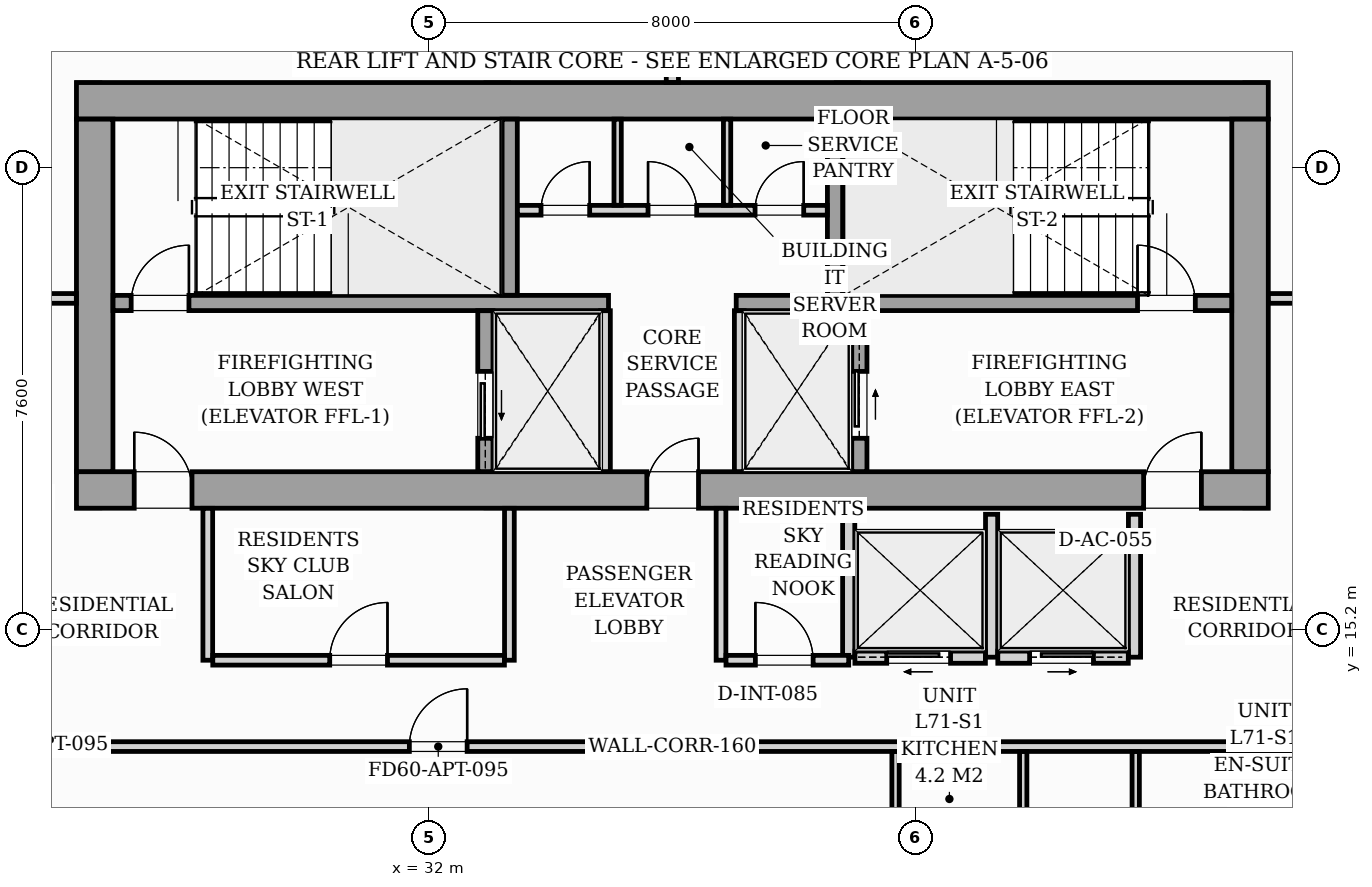
"""IFC4 building model, lengths in metres.
Left out: names, types, materials, properties, quantities, classifications, styles, units other than length and angle.
Written with IfcOpenShell. Run it as: python <this file> out.ifc"""

import sys

from ifc_helpers import new_model, si_unit, direction, frame, frame_2d, origin, origin_2d, place, context, subcontext, project, spatial, rectangle, i_section, extrude, source, transform, mapped, element, fill, save


model = new_model("IFC4")
c1 = context("Model", 3, precision=1e-05, world=origin(), true_north=direction((0.0, 1.0)))
c2 = subcontext(c1, "Body", "Model", "MODEL_VIEW")
j1 = project(units=[si_unit("LENGTHUNIT", "METRE"), si_unit("PLANEANGLEUNIT", "RADIAN")], contexts=[c1])
p1 = place(None, origin())
s1 = spatial("IfcSite", under=j1, at=p1, CompositionType="ELEMENT")
p2 = place(p1, origin())
s2 = spatial("IfcBuilding", under=s1, at=p2, CompositionType="ELEMENT")
p3 = place(p2, frame((0.0, 0.0, 246.3)))
s3 = spatial("IfcBuildingStorey", under=s2, at=p3, CompositionType="ELEMENT", Elevation=246.3)
m1 = source(origin(), c2, "Body", "SweptSolid", [
    extrude(i_section(OverallWidth=0.409, OverallDepth=0.425, WebThickness=0.033, FlangeThickness=0.052, FilletRadius=0.018, at=origin_2d()), origin(), (0.0, 0.0, 1.0), 3.296),
])
for number, where, z_axis, x_axis in (
    (1, (26.4, 17.4, 0.002), (0.0, 0.0, 1.0), (1.0, 0.0, 0.0)),
    (2, (33.12, 17.4, 0.002), (0.0, 0.0, 1.0), (1.0, 0.0, 0.0)),
    (3, (38.88, 17.4, 0.002), (0.0, 0.0, 1.0), (1.0, 0.0, 0.0)),
    (4, (45.6, 17.4, 0.002), (0.0, 0.0, 1.0), (1.0, 0.0, 0.0)),
    (5, (26.4, 24.0, 0.002), (0.0, 0.0, 1.0), (1.0, 0.0, 0.0)),
    (6, (33.12, 24.0, 0.002), (0.0, 0.0, 1.0), (1.0, 0.0, 0.0)),
    (7, (38.88, 24.0, 0.002), (0.0, 0.0, 1.0), (1.0, 0.0, 0.0)),
    (8, (45.6, 24.0, 0.002), (0.0, 0.0, 1.0), (1.0, 0.0, 0.0)),
):
    element("IfcColumn", number, at=place(p3, frame(where, z_axis=z_axis, x_axis=x_axis)), inside=s3, PredefinedType="PILASTER", context=c2, shape_type="MappedRepresentation", body=[
        mapped(m1, transform((0.0, 0.0, 0.0), scale=1.0)),
    ])
p4 = place(p3, frame((26.2, 17.5, 0.0), z_axis=(0.0, 0.0, 1.0), x_axis=(1.0, 0.0, 0.0)))
e9 = element("IfcWall", 9, at=p4, inside=s3, PredefinedType="SHEAR", context=c2, shape_type="SweptSolid", body=[
    extrude(rectangle(XDim=19.6, YDim=0.6, at=frame_2d((9.8, 0.0))), origin(), (0.0, 0.0, 1.0), 3.3),
])
p5 = place(p4, frame((0.95, 0.0, 0.0)))
e10 = element("IfcOpeningElement", 10, at=p5, cuts=e9, PredefinedType="OPENING", context=c2, shape_type="SweptSolid", body=[
    extrude(rectangle(XDim=0.95, YDim=2.06, at=frame_2d((0.475, 1.03))), frame((0.0, 0.31, 0.0), z_axis=(0.0, -1.0, 0.0), x_axis=(1.0, 0.0, 0.0)), (0.0, 0.0, 1.0), 0.62),
])
p6 = place(p4, frame((9.38, 0.0, 0.0)))
e11 = element("IfcOpeningElement", 11, at=p6, cuts=e9, PredefinedType="OPENING", context=c2, shape_type="SweptSolid", body=[
    extrude(rectangle(XDim=0.85, YDim=2.0, at=frame_2d((0.425, 1.0))), frame((0.0, 0.31, 0.0), z_axis=(0.0, -1.0, 0.0), x_axis=(1.0, 0.0, 0.0)), (0.0, 0.0, 1.0), 0.62),
])
p7 = place(p4, frame((17.55, 0.0, 0.0)))
e12 = element("IfcOpeningElement", 12, at=p7, cuts=e9, PredefinedType="OPENING", context=c2, shape_type="SweptSolid", body=[
    extrude(rectangle(XDim=0.95, YDim=2.06, at=frame_2d((0.475, 1.03))), frame((0.0, 0.31, 0.0), z_axis=(0.0, -1.0, 0.0), x_axis=(1.0, 0.0, 0.0)), (0.0, 0.0, 1.0), 0.62),
])
p8 = place(p3, frame((26.2, 23.9, 0.0), z_axis=(0.0, 0.0, 1.0), x_axis=(1.0, 0.0, 0.0)))
e13 = element("IfcWall", 13, at=p8, inside=s3, PredefinedType="SHEAR", context=c2, shape_type="SweptSolid", body=[
    extrude(rectangle(XDim=19.6, YDim=0.6, at=frame_2d((9.8, 0.0))), origin(), (0.0, 0.0, 1.0), 3.3),
])
for number, where, z_axis, x_axis in (
    (14, (26.5, 17.802, 0.0), (0.0, 0.0, 1.0), (0.0, 1.0, 0.0)),
    (15, (45.5, 17.802, 0.0), (0.0, 0.0, 1.0), (0.0, 1.0, 0.0)),
):
    element("IfcWall", number, at=place(p3, frame(where, z_axis=z_axis, x_axis=x_axis)), inside=s3, PredefinedType="SHEAR", context=c2, shape_type="SweptSolid", body=[
        extrude(rectangle(XDim=5.796, YDim=0.6, at=frame_2d((2.898, 0.0))), origin(), (0.0, 0.0, 1.0), 3.3),
    ])
p9 = place(p3, frame((26.802, 20.575, 0.0), z_axis=(0.0, 0.0, 1.0), x_axis=(1.0, 0.0, 0.0)))
e16 = element("IfcWall", 16, at=p9, inside=s3, PredefinedType="SOLIDWALL", context=c2, shape_type="SweptSolid", body=[
    extrude(rectangle(XDim=8.148, YDim=0.25, at=frame_2d((4.074, 0.0))), origin(), (0.0, 0.0, 1.0), 3.3),
])
p10 = place(p9, frame((0.298, 0.0, 0.0)))
e17 = element("IfcOpeningElement", 17, at=p10, cuts=e16, PredefinedType="OPENING", context=c2, shape_type="SweptSolid", body=[
    extrude(rectangle(XDim=0.95, YDim=2.06, at=frame_2d((0.475, 1.03))), frame((0.0, 0.135, 0.0), z_axis=(0.0, -1.0, 0.0), x_axis=(1.0, 0.0, 0.0)), (0.0, 0.0, 1.0), 0.27),
])
p11 = place(p3, frame((37.05, 20.575, 0.0), z_axis=(0.0, 0.0, 1.0), x_axis=(1.0, 0.0, 0.0)))
e18 = element("IfcWall", 18, at=p11, inside=s3, PredefinedType="SOLIDWALL", context=c2, shape_type="SweptSolid", body=[
    extrude(rectangle(XDim=8.148, YDim=0.25, at=frame_2d((4.074, 0.0))), origin(), (0.0, 0.0, 1.0), 3.3),
])
p12 = place(p11, frame((6.6, 0.0, 0.0)))
e19 = element("IfcOpeningElement", 19, at=p12, cuts=e18, PredefinedType="OPENING", context=c2, shape_type="SweptSolid", body=[
    extrude(rectangle(XDim=0.95, YDim=2.06, at=frame_2d((0.475, 1.03))), frame((0.0, 0.135, 0.0), z_axis=(0.0, -1.0, 0.0), x_axis=(1.0, 0.0, 0.0)), (0.0, 0.0, 1.0), 0.27),
])
for number, where, z_axis, x_axis in (
    (20, (33.325, 20.702, 0.0), (0.0, 0.0, 1.0), (0.0, 1.0, 0.0)),
    (21, (38.675, 20.702, 0.0), (0.0, 0.0, 1.0), (0.0, 1.0, 0.0)),
):
    element("IfcWall", number, at=place(p3, frame(where, z_axis=z_axis, x_axis=x_axis)), inside=s3, PredefinedType="SOLIDWALL", context=c2, shape_type="SweptSolid", body=[
        extrude(rectangle(XDim=2.896, YDim=0.25, at=frame_2d((1.448, 0.0))), origin(), (0.0, 0.0, 1.0), 3.3),
    ])
p13 = place(p3, frame((32.925, 17.802, 0.0), z_axis=(0.0, 0.0, 1.0), x_axis=(0.0, 1.0, 0.0)))
e22 = element("IfcWall", 22, at=p13, inside=s3, PredefinedType="SOLIDWALL", context=c2, shape_type="SweptSolid", body=[
    extrude(rectangle(XDim=2.646, YDim=0.25, at=frame_2d((1.323, 0.0))), origin(), (0.0, 0.0, 1.0), 3.3),
])
p14 = place(p13, frame((0.548, 0.0, 0.0)))
e23 = element("IfcOpeningElement", 23, at=p14, cuts=e22, PredefinedType="OPENING", context=c2, shape_type="SweptSolid", body=[
    extrude(rectangle(XDim=1.1, YDim=2.08, at=frame_2d((0.55, 1.04))), frame((0.0, 0.135, 0.0), z_axis=(0.0, -1.0, 0.0), x_axis=(1.0, 0.0, 0.0)), (0.0, 0.0, 1.0), 0.27),
])
for number, where, z_axis, x_axis in (
    (24, (34.9, 17.802, 0.0), (0.0, 0.0, 1.0), (0.0, 1.0, 0.0)),
    (25, (37.1, 17.802, 0.0), (0.0, 0.0, 1.0), (0.0, 1.0, 0.0)),
):
    element("IfcWall", number, at=place(p3, frame(where, z_axis=z_axis, x_axis=x_axis)), inside=s3, PredefinedType="PARTITIONING", context=c2, shape_type="SweptSolid", body=[
        extrude(rectangle(XDim=2.646, YDim=0.16, at=frame_2d((1.323, 0.0))), origin(), (0.0, 0.0, 1.0), 3.04),
    ])
p15 = place(p3, frame((39.075, 17.802, 0.0), z_axis=(0.0, 0.0, 1.0), x_axis=(0.0, 1.0, 0.0)))
e26 = element("IfcWall", 26, at=p15, inside=s3, PredefinedType="SOLIDWALL", context=c2, shape_type="SweptSolid", body=[
    extrude(rectangle(XDim=2.646, YDim=0.25, at=frame_2d((1.323, 0.0))), origin(), (0.0, 0.0, 1.0), 3.3),
])
p16 = place(p15, frame((0.548, 0.0, 0.0)))
e27 = element("IfcOpeningElement", 27, at=p16, cuts=e26, PredefinedType="OPENING", context=c2, shape_type="SweptSolid", body=[
    extrude(rectangle(XDim=1.1, YDim=2.08, at=frame_2d((0.55, 1.04))), frame((0.0, 0.135, 0.0), z_axis=(0.0, -1.0, 0.0), x_axis=(1.0, 0.0, 0.0)), (0.0, 0.0, 1.0), 0.27),
])
p17 = place(p3, frame((33.452, 22.1, 0.0), z_axis=(0.0, 0.0, 1.0), x_axis=(1.0, 0.0, 0.0)))
e28 = element("IfcWall", 28, at=p17, inside=s3, PredefinedType="PARTITIONING", context=c2, shape_type="SweptSolid", body=[
    extrude(rectangle(XDim=5.096, YDim=0.16, at=frame_2d((2.548, 0.0))), origin(), (0.0, 0.0, 1.0), 3.04),
])
p18 = place(p17, frame((0.388, 0.0, 0.0)))
e29 = element("IfcOpeningElement", 29, at=p18, cuts=e28, PredefinedType="OPENING", context=c2, shape_type="SweptSolid", body=[
    extrude(rectangle(XDim=0.8, YDim=2.05, at=frame_2d((0.4, 1.025))), frame((0.0, 0.09, 0.0), z_axis=(0.0, -1.0, 0.0), x_axis=(1.0, 0.0, 0.0)), (0.0, 0.0, 1.0), 0.18),
])
p19 = place(p17, frame((2.148, 0.0, 0.0)))
e30 = element("IfcOpeningElement", 30, at=p19, cuts=e28, PredefinedType="OPENING", context=c2, shape_type="SweptSolid", body=[
    extrude(rectangle(XDim=0.8, YDim=2.05, at=frame_2d((0.4, 1.025))), frame((0.0, 0.09, 0.0), z_axis=(0.0, -1.0, 0.0), x_axis=(1.0, 0.0, 0.0)), (0.0, 0.0, 1.0), 0.18),
])
p20 = place(p17, frame((3.908, 0.0, 0.0)))
e31 = element("IfcOpeningElement", 31, at=p20, cuts=e28, PredefinedType="OPENING", context=c2, shape_type="SweptSolid", body=[
    extrude(rectangle(XDim=0.8, YDim=2.05, at=frame_2d((0.4, 1.025))), frame((0.0, 0.09, 0.0), z_axis=(0.0, -1.0, 0.0), x_axis=(1.0, 0.0, 0.0)), (0.0, 0.0, 1.0), 0.18),
])
for number, where, z_axis, x_axis in (
    (32, (35.1, 22.182, 0.0), (0.0, 0.0, 1.0), (0.0, 1.0, 0.0)),
    (33, (36.9, 22.182, 0.0), (0.0, 0.0, 1.0), (0.0, 1.0, 0.0)),
):
    element("IfcWall", number, at=place(p3, frame(where, z_axis=z_axis, x_axis=x_axis)), inside=s3, PredefinedType="PARTITIONING", context=c2, shape_type="SweptSolid", body=[
        extrude(rectangle(XDim=1.416, YDim=0.12, at=frame_2d((0.708, 0.0))), origin(), (0.0, 0.0, 1.0), 3.04),
    ])
for number, where, z_axis, x_axis in (
    (34, (38.9, 14.75, 0.0), (0.0, 0.0, 1.0), (0.0, 1.0, 0.0)),
    (35, (41.25, 14.75, 0.0), (0.0, 0.0, 1.0), (0.0, 1.0, 0.0)),
    (36, (43.6, 14.75, 0.0), (0.0, 0.0, 1.0), (0.0, 1.0, 0.0)),
):
    element("IfcWall", number, at=place(p3, frame(where, z_axis=z_axis, x_axis=x_axis)), inside=s3, PredefinedType="PARTITIONING", context=c2, shape_type="SweptSolid", body=[
        extrude(rectangle(XDim=2.35, YDim=0.2, at=frame_2d((1.175, 0.0))), origin(), (0.0, 0.0, 1.0), 3.04),
    ])
p21 = place(p3, frame((39.002, 14.75, 0.0), z_axis=(0.0, 0.0, 1.0), x_axis=(1.0, 0.0, 0.0)))
e37 = element("IfcWall", 37, at=p21, inside=s3, PredefinedType="PARTITIONING", context=c2, shape_type="SweptSolid", body=[
    extrude(rectangle(XDim=2.146, YDim=0.2, at=frame_2d((1.073, 0.0))), origin(), (0.0, 0.0, 1.0), 3.04),
])
p22 = place(p21, frame((0.523, 0.0, 0.0)))
e38 = element("IfcOpeningElement", 38, at=p22, cuts=e37, PredefinedType="OPENING", context=c2, shape_type="SweptSolid", body=[
    extrude(rectangle(XDim=1.05, YDim=2.08, at=frame_2d((0.525, 1.04))), frame((0.0, 0.11, 0.0), z_axis=(0.0, -1.0, 0.0), x_axis=(1.0, 0.0, 0.0)), (0.0, 0.0, 1.0), 0.22),
])
p23 = place(p3, frame((41.352, 14.75, 0.0), z_axis=(0.0, 0.0, 1.0), x_axis=(1.0, 0.0, 0.0)))
e39 = element("IfcWall", 39, at=p23, inside=s3, PredefinedType="PARTITIONING", context=c2, shape_type="SweptSolid", body=[
    extrude(rectangle(XDim=2.146, YDim=0.2, at=frame_2d((1.073, 0.0))), origin(), (0.0, 0.0, 1.0), 3.04),
])
p24 = place(p23, frame((0.523, 0.0, 0.0)))
e40 = element("IfcOpeningElement", 40, at=p24, cuts=e39, PredefinedType="OPENING", context=c2, shape_type="SweptSolid", body=[
    extrude(rectangle(XDim=1.05, YDim=2.08, at=frame_2d((0.525, 1.04))), frame((0.0, 0.11, 0.0), z_axis=(0.0, -1.0, 0.0), x_axis=(1.0, 0.0, 0.0)), (0.0, 0.0, 1.0), 0.22),
])
p25 = place(p3, frame((24.55, 13.28, 0.0), z_axis=(0.0, 0.0, 1.0), x_axis=(1.0, 0.0, 0.0)))
e41 = element("IfcWall", 41, at=p25, inside=s3, PredefinedType="PARTITIONING", context=c2, shape_type="SweptSolid", body=[
    extrude(rectangle(XDim=22.9, YDim=0.16, at=frame_2d((11.45, 0.0))), origin(), (0.0, 0.0, 1.0), 2.556),
])
p26 = place(p25, frame((7.125, 0.0, 0.0)))
e42 = element("IfcOpeningElement", 42, at=p26, cuts=e41, PredefinedType="OPENING", context=c2, shape_type="SweptSolid", body=[
    extrude(rectangle(XDim=0.95, YDim=2.06, at=frame_2d((0.475, 1.03))), frame((0.0, 0.09, 0.0), z_axis=(0.0, -1.0, 0.0), x_axis=(1.0, 0.0, 0.0)), (0.0, 0.0, 1.0), 0.18),
])
p27 = place(p3, frame((36.0, 24.202, 0.0), z_axis=(0.0, 0.0, 1.0), x_axis=(0.0, 1.0, 0.0)))
e43 = element("IfcWall", 43, at=p27, inside=s3, PredefinedType="PARTITIONING", context=c2, shape_type="SweptSolid", body=[
    extrude(rectangle(XDim=2.363, YDim=0.2, at=frame_2d((1.182, 0.0))), origin(), (0.0, 0.0, 1.0), 3.04),
])
for number, where, z_axis, x_axis in (
    (44, (24.632, 20.65, 0.0), (0.0, 0.0, 1.0), (1.0, 0.0, 0.0)),
    (45, (45.802, 20.65, 0.0), (0.0, 0.0, 1.0), (1.0, 0.0, 0.0)),
):
    element("IfcWall", number, at=place(p3, frame(where, z_axis=z_axis, x_axis=x_axis)), inside=s3, PredefinedType="PARTITIONING", context=c2, shape_type="SweptSolid", body=[
        extrude(rectangle(XDim=1.566, YDim=0.16, at=frame_2d((0.783, 0.0))), origin(), (0.0, 0.0, 1.0), 3.04),
    ])
p28 = place(p3, frame((43.62, 8.342, 0.0), z_axis=(0.0, 0.0, 1.0), x_axis=(0.0, 1.0, 0.0)))
e46 = element("IfcWall", 46, at=p28, inside=s3, PredefinedType="PARTITIONING", context=c2, shape_type="SweptSolid", body=[
    extrude(rectangle(XDim=4.856, YDim=0.12, at=frame_2d((2.428, 0.0))), origin(), (0.0, 0.0, 1.0), 3.04),
])
p29 = place(p28, frame((2.0, 0.0, 0.0)))
e47 = element("IfcOpeningElement", 47, at=p29, cuts=e46, PredefinedType="OPENING", context=c2, shape_type="SweptSolid", body=[
    extrude(rectangle(XDim=0.55, YDim=2.0, at=frame_2d((0.275, 1.0))), frame((0.0, 0.07, 0.0), z_axis=(0.0, -1.0, 0.0), x_axis=(1.0, 0.0, 0.0)), (0.0, 0.0, 1.0), 0.14),
])
for number, where, z_axis, x_axis in (
    (48, (41.77, 11.092, 0.0), (0.0, 0.0, 1.0), (0.0, 1.0, 0.0)),
    (49, (39.67, 11.092, 0.0), (0.0, 0.0, 1.0), (0.0, 1.0, 0.0)),
):
    element("IfcWall", number, at=place(p3, frame(where, z_axis=z_axis, x_axis=x_axis)), inside=s3, PredefinedType="PARTITIONING", context=c2, shape_type="SweptSolid", body=[
        extrude(rectangle(XDim=2.106, YDim=0.12, at=frame_2d((1.053, 0.0))), origin(), (0.0, 0.0, 1.0), 3.04),
    ])
for number, where, z_axis, x_axis in (
    (50, (28.36, 14.7, 0.0), (0.0, 0.0, 1.0), (0.0, 1.0, 0.0)),
    (51, (33.32, 14.7, 0.0), (0.0, 0.0, 1.0), (0.0, 1.0, 0.0)),
):
    element("IfcWall", number, at=place(p3, frame(where, z_axis=z_axis, x_axis=x_axis)), inside=s3, PredefinedType="PARTITIONING", context=c2, shape_type="SweptSolid", body=[
        extrude(rectangle(XDim=2.498, YDim=0.16, at=frame_2d((1.249, 0.0))), origin(), (0.0, 0.0, 1.0), 3.04),
    ])
p30 = place(p3, frame((28.442, 14.7, 0.0), z_axis=(0.0, 0.0, 1.0), x_axis=(1.0, 0.0, 0.0)))
e52 = element("IfcWall", 52, at=p30, inside=s3, PredefinedType="PARTITIONING", context=c2, shape_type="SweptSolid", body=[
    extrude(rectangle(XDim=4.796, YDim=0.16, at=frame_2d((2.398, 0.0))), origin(), (0.0, 0.0, 1.0), 2.556),
])
p31 = place(p30, frame((1.923, 0.0, 0.0)))
e53 = element("IfcOpeningElement", 53, at=p31, cuts=e52, PredefinedType="OPENING", context=c2, shape_type="SweptSolid", body=[
    extrude(rectangle(XDim=0.95, YDim=2.06, at=frame_2d((0.475, 1.03))), frame((0.0, 0.09, 0.0), z_axis=(0.0, -1.0, 0.0), x_axis=(1.0, 0.0, 0.0)), (0.0, 0.0, 1.0), 0.18),
])
p32 = place(p3, frame((36.8, 14.7, 0.0), z_axis=(0.0, 0.0, 1.0), x_axis=(0.0, 1.0, 0.0)))
e54 = element("IfcWall", 54, at=p32, inside=s3, PredefinedType="PARTITIONING", context=c2, shape_type="SweptSolid", body=[
    extrude(rectangle(XDim=2.498, YDim=0.16, at=frame_2d((1.249, 0.0))), origin(), (0.0, 0.0, 1.0), 3.04),
])
p33 = place(p3, frame((36.882, 14.7, 0.0), z_axis=(0.0, 0.0, 1.0), x_axis=(1.0, 0.0, 0.0)))
e55 = element("IfcWall", 55, at=p33, inside=s3, PredefinedType="PARTITIONING", context=c2, shape_type="SweptSolid", body=[
    extrude(rectangle(XDim=2.018, YDim=0.16, at=frame_2d((1.009, 0.0))), origin(), (0.0, 0.0, 1.0), 3.04),
])
p34 = place(p33, frame((0.483, 0.0, 0.0)))
e56 = element("IfcOpeningElement", 56, at=p34, cuts=e55, PredefinedType="OPENING", context=c2, shape_type="SweptSolid", body=[
    extrude(rectangle(XDim=0.95, YDim=2.06, at=frame_2d((0.475, 1.03))), frame((0.0, 0.09, 0.0), z_axis=(0.0, -1.0, 0.0), x_axis=(1.0, 0.0, 0.0)), (0.0, 0.0, 1.0), 0.18),
])
m2 = source(origin(), c2, "Body", "SweptSolid", [
    extrude(rectangle(XDim=0.95, YDim=2.06, at=frame_2d((0.475, 1.03))), frame((0.0, 0.025, 0.0), z_axis=(0.0, -1.0, 0.0), x_axis=(1.0, 0.0, 0.0)), (0.0, 0.0, 1.0), 0.05),
])
p35 = place(p5, origin())
e57 = element("IfcDoor", 57, at=p35, inside=s3, OperationType="SINGLE_SWING_LEFT", PredefinedType="DOOR", context=c2, shape_type="MappedRepresentation", body=[
    mapped(m2, transform((0.0, 0.0, 0.0), scale=1.0)),
])
fill(e10, e57)
m3 = source(origin(), c2, "Body", "SweptSolid", [
    extrude(rectangle(XDim=0.85, YDim=2.0, at=frame_2d((0.425, 1.0))), frame((0.0, 0.025, 0.0), z_axis=(0.0, -1.0, 0.0), x_axis=(1.0, 0.0, 0.0)), (0.0, 0.0, 1.0), 0.05),
])
p36 = place(p6, origin())
e58 = element("IfcDoor", 58, at=p36, inside=s3, OperationType="SINGLE_SWING_RIGHT", PredefinedType="DOOR", context=c2, shape_type="MappedRepresentation", body=[
    mapped(m3, transform((0.0, 0.0, 0.0), scale=1.0)),
])
fill(e11, e58)
p37 = place(p7, origin())
e59 = element("IfcDoor", 59, at=p37, inside=s3, OperationType="SINGLE_SWING_RIGHT", PredefinedType="DOOR", context=c2, shape_type="MappedRepresentation", body=[
    mapped(m2, transform((0.0, 0.0, 0.0), scale=1.0)),
])
fill(e12, e59)
p38 = place(p10, origin())
e60 = element("IfcDoor", 60, at=p38, inside=s3, OperationType="SINGLE_SWING_RIGHT", PredefinedType="DOOR", context=c2, shape_type="MappedRepresentation", body=[
    mapped(m2, transform((0.0, 0.0, 0.0), scale=1.0)),
])
fill(e17, e60)
p39 = place(p12, origin())
e61 = element("IfcDoor", 61, at=p39, inside=s3, OperationType="SINGLE_SWING_LEFT", PredefinedType="DOOR", context=c2, shape_type="MappedRepresentation", body=[
    mapped(m2, transform((0.0, 0.0, 0.0), scale=1.0)),
])
fill(e19, e61)
m4 = source(origin(), c2, "Body", "SweptSolid", [
    extrude(rectangle(XDim=1.1, YDim=2.08, at=frame_2d((0.55, 1.04))), frame((0.0, 0.025, 0.0), z_axis=(0.0, -1.0, 0.0), x_axis=(1.0, 0.0, 0.0)), (0.0, 0.0, 1.0), 0.05),
])
p40 = place(p14, origin())
e62 = element("IfcDoor", 62, at=p40, inside=s3, OperationType="SLIDING_TO_LEFT", PredefinedType="DOOR", context=c2, shape_type="MappedRepresentation", body=[
    mapped(m4, transform((0.0, 0.0, 0.0), scale=1.0)),
])
fill(e23, e62)
p41 = place(p16, origin())
e63 = element("IfcDoor", 63, at=p41, inside=s3, OperationType="SLIDING_TO_RIGHT", PredefinedType="DOOR", context=c2, shape_type="MappedRepresentation", body=[
    mapped(m4, transform((0.0, 0.0, 0.0), scale=1.0)),
])
fill(e27, e63)
m5 = source(origin(), c2, "Body", "SweptSolid", [
    extrude(rectangle(XDim=0.8, YDim=2.05, at=frame_2d((0.4, 1.025))), frame((0.0, 0.025, 0.0), z_axis=(0.0, -1.0, 0.0), x_axis=(1.0, 0.0, 0.0)), (0.0, 0.0, 1.0), 0.05),
])
p42 = place(p18, origin())
e64 = element("IfcDoor", 64, at=p42, inside=s3, OperationType="SINGLE_SWING_RIGHT", PredefinedType="DOOR", context=c2, shape_type="MappedRepresentation", body=[
    mapped(m5, transform((0.0, 0.0, 0.0), scale=1.0)),
])
fill(e29, e64)
p43 = place(p19, origin())
e65 = element("IfcDoor", 65, at=p43, inside=s3, OperationType="SINGLE_SWING_LEFT", PredefinedType="DOOR", context=c2, shape_type="MappedRepresentation", body=[
    mapped(m5, transform((0.0, 0.0, 0.0), scale=1.0)),
])
fill(e30, e65)
p44 = place(p20, origin())
e66 = element("IfcDoor", 66, at=p44, inside=s3, OperationType="SINGLE_SWING_RIGHT", PredefinedType="DOOR", context=c2, shape_type="MappedRepresentation", body=[
    mapped(m5, transform((0.0, 0.0, 0.0), scale=1.0)),
])
fill(e31, e66)
m6 = source(origin(), c2, "Body", "SweptSolid", [
    extrude(rectangle(XDim=1.05, YDim=2.08, at=frame_2d((0.525, 1.04))), frame((0.0, 0.025, 0.0), z_axis=(0.0, -1.0, 0.0), x_axis=(1.0, 0.0, 0.0)), (0.0, 0.0, 1.0), 0.05),
])
p45 = place(p22, origin())
e67 = element("IfcDoor", 67, at=p45, inside=s3, OperationType="SLIDING_TO_LEFT", PredefinedType="DOOR", context=c2, shape_type="MappedRepresentation", body=[
    mapped(m6, transform((0.0, 0.0, 0.0), scale=1.0)),
])
fill(e38, e67)
p46 = place(p24, origin())
e68 = element("IfcDoor", 68, at=p46, inside=s3, OperationType="SLIDING_TO_RIGHT", PredefinedType="DOOR", context=c2, shape_type="MappedRepresentation", body=[
    mapped(m6, transform((0.0, 0.0, 0.0), scale=1.0)),
])
fill(e40, e68)
m7 = source(origin(), c2, "Body", "SweptSolid", [
    extrude(rectangle(XDim=0.95, YDim=2.06, at=frame_2d((0.475, 1.03))), frame((0.0, 0.025, 0.0), z_axis=(0.0, -1.0, 0.0), x_axis=(1.0, 0.0, 0.0)), (0.0, 0.0, 1.0), 0.05),
])
p47 = place(p26, origin())
e69 = element("IfcDoor", 69, at=p47, inside=s3, OperationType="SINGLE_SWING_RIGHT", PredefinedType="DOOR", context=c2, shape_type="MappedRepresentation", body=[
    mapped(m7, transform((0.0, 0.0, 0.0), scale=1.0)),
])
fill(e42, e69)
p48 = place(p31, origin())
e70 = element("IfcDoor", 70, at=p48, inside=s3, OperationType="SINGLE_SWING_RIGHT", PredefinedType="DOOR", context=c2, shape_type="MappedRepresentation", body=[
    mapped(m7, transform((0.0, 0.0, 0.0), scale=1.0)),
])
fill(e53, e70)
p49 = place(p34, origin())
e71 = element("IfcDoor", 71, at=p49, inside=s3, OperationType="SINGLE_SWING_LEFT", PredefinedType="DOOR", context=c2, shape_type="MappedRepresentation", body=[
    mapped(m7, transform((0.0, 0.0, 0.0), scale=1.0)),
])
fill(e56, e71)
save(model, sys.argv[1])
